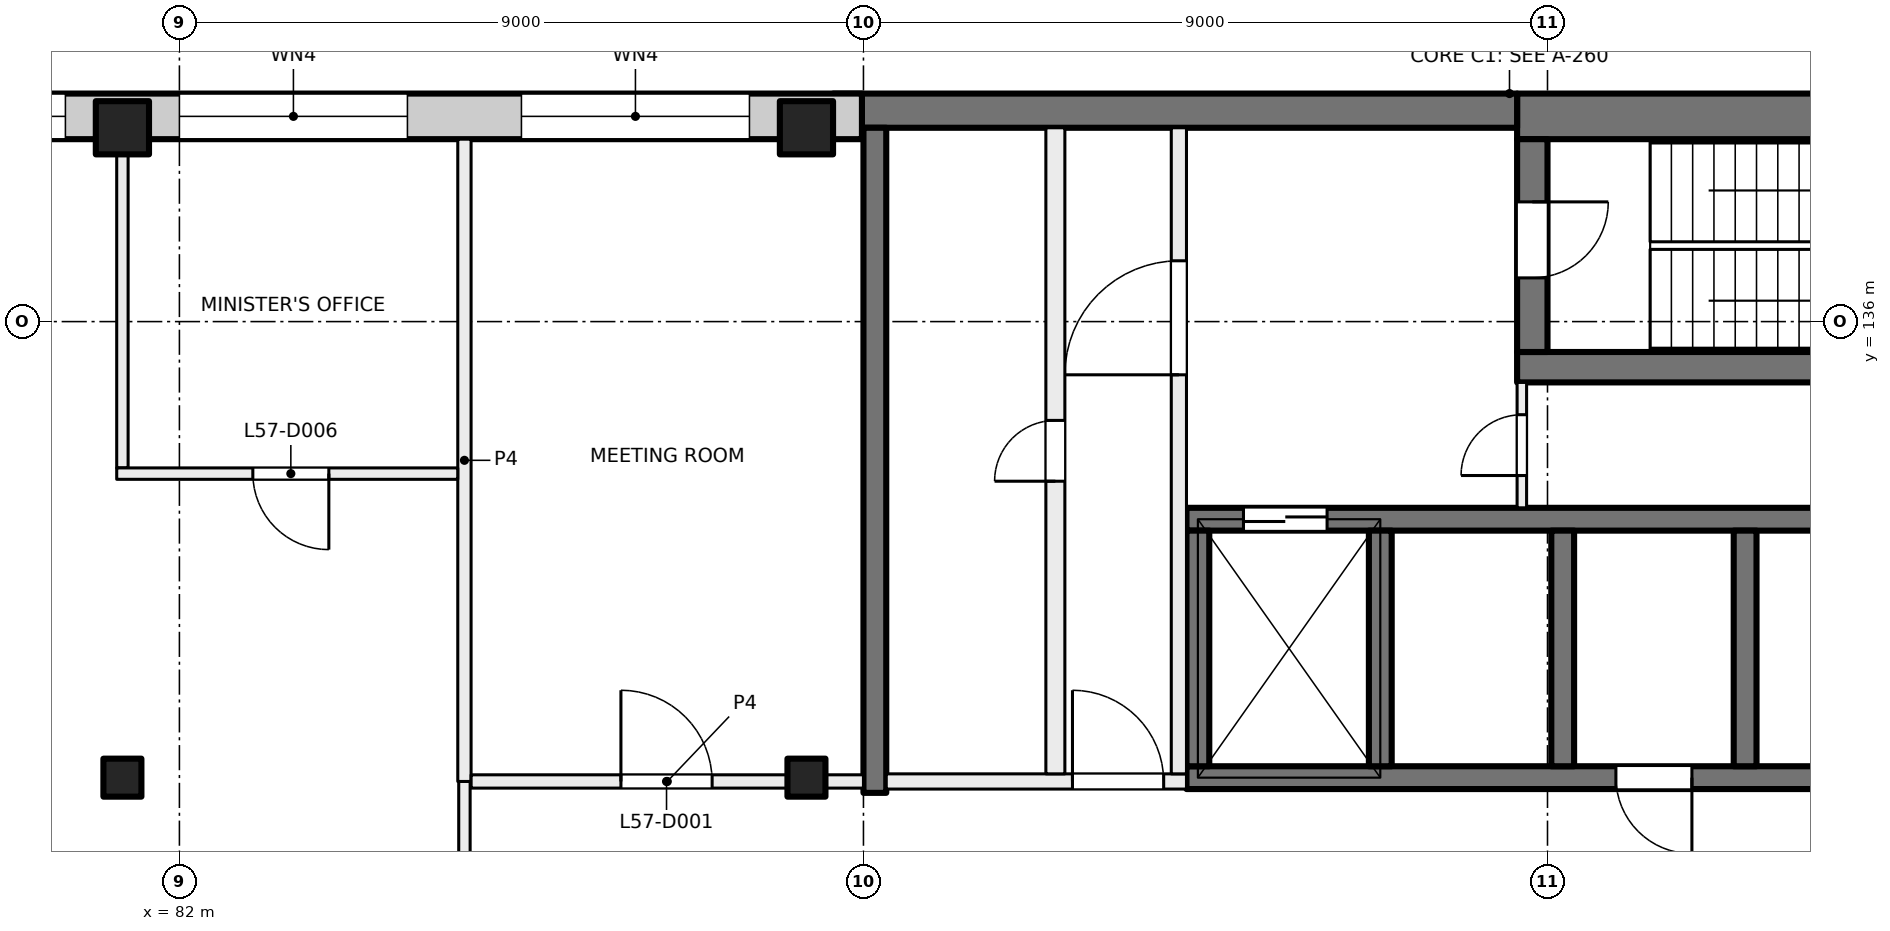
"""IFC4 building model, lengths in metres.
Left out: names, types, materials, properties, quantities, classifications, styles, units other than length and angle.
Written with IfcOpenShell. Run it as: python <this file> out.ifc"""

import sys

from ifc_helpers import new_model, si_unit, direction, frame, frame_2d, origin, origin_2d, place, context, subcontext, project, spatial, rectangle, extrude, element, fill, save


model = new_model("IFC4")
c1 = context("Model", 3, precision=1e-05, world=origin(), true_north=direction((0.0, 1.0)))
c2 = subcontext(c1, "Body", "Model", "MODEL_VIEW")
j1 = project(units=[si_unit("LENGTHUNIT", "METRE"), si_unit("PLANEANGLEUNIT", "RADIAN")], contexts=[c1])
p1 = place(None, origin())
s1 = spatial("IfcSite", under=j1, at=p1, CompositionType="ELEMENT")
p2 = place(p1, origin())
s2 = spatial("IfcBuilding", under=s1, at=p2, CompositionType="ELEMENT")
p3 = place(p2, frame((0.0, 0.0, 241.5)))
s3 = spatial("IfcBuildingStorey", under=s2, at=p3, CompositionType="ELEMENT", Elevation=241.5)
for number, where, z_axis, x_axis in (
    (1, (81.25, 130.0, 0.0), (0.0, 0.0, 1.0), (1.0, 0.0, 0.0)),
    (2, (90.25, 130.0, 0.0), (0.0, 0.0, 1.0), (1.0, 0.0, 0.0)),
):
    element("IfcColumn", number, at=place(p3, frame(where, z_axis=z_axis, x_axis=x_axis)), inside=s3, PredefinedType="COLUMN", context=c2, shape_type="SweptSolid", body=[
        extrude(rectangle(XDim=0.5, YDim=0.5, at=origin_2d()), origin(), (0.0, 0.0, 1.0), 4.0),
    ])
for number, where, z_axis, x_axis in (
    (3, (81.25, 138.55, 0.0), (0.0, 0.0, 1.0), (1.0, 0.0, 0.0)),
    (4, (90.25, 138.55, 0.0), (0.0, 0.0, 1.0), (1.0, 0.0, 0.0)),
):
    element("IfcColumn", number, at=place(p3, frame(where, z_axis=z_axis, x_axis=x_axis)), inside=s3, PredefinedType="COLUMN", context=c2, shape_type="SweptSolid", body=[
        extrude(rectangle(XDim=0.7, YDim=0.7, at=origin_2d()), origin(), (0.0, 0.0, 1.0), 4.0),
    ])
p4 = place(p3, frame((107.4, 138.7, 0.0), z_axis=(0.0, 0.0, 1.0), x_axis=(-1.0, 0.0, 0.0)))
e5 = element("IfcWall", 5, at=p4, inside=s3, PredefinedType="SHEAR", context=c2, shape_type="SweptSolid", body=[
    extrude(rectangle(XDim=7.8, YDim=0.6, at=frame_2d((3.9, 0.0))), origin(), (0.0, 0.0, 1.0), 4.0),
])
p5 = place(p3, frame((99.6, 138.775, 0.0), z_axis=(0.0, 0.0, 1.0), x_axis=(-1.0, 0.0, 0.0)))
e6 = element("IfcWall", 6, at=p5, inside=s3, PredefinedType="SHEAR", context=c2, shape_type="SweptSolid", body=[
    extrude(rectangle(XDim=9.0, YDim=0.45, at=frame_2d((4.5, 0.0))), origin(), (0.0, 0.0, 1.0), 4.0),
])
p6 = place(p3, frame((107.4, 135.4, 0.0), z_axis=(0.0, 0.0, 1.0), x_axis=(-1.0, 0.0, 0.0)))
e7 = element("IfcWall", 7, at=p6, inside=s3, PredefinedType="SHEAR", context=c2, shape_type="SweptSolid", body=[
    extrude(rectangle(XDim=7.8, YDim=0.4, at=frame_2d((3.9, 0.0))), origin(), (0.0, 0.0, 1.0), 4.0),
])
p7 = place(p3, frame((99.8, 138.4, 0.0), z_axis=(0.0, 0.0, 1.0), x_axis=(0.0, -1.0, 0.0)))
e8 = element("IfcWall", 8, at=p7, inside=s3, PredefinedType="SHEAR", context=c2, shape_type="SweptSolid", body=[
    extrude(rectangle(XDim=2.8, YDim=0.4, at=frame_2d((1.4, 0.0))), origin(), (0.0, 0.0, 1.0), 4.0),
])
p8 = place(p7, frame((0.825, 0.0, 0.0)))
e9 = element("IfcOpeningElement", 9, at=p8, cuts=e8, PredefinedType="OPENING", context=c2, shape_type="SweptSolid", body=[
    extrude(rectangle(XDim=1.0, YDim=2.1, at=frame_2d((0.5, 1.05))), frame((0.0, 0.21, 0.0), z_axis=(0.0, -1.0, 0.0), x_axis=(1.0, 0.0, 0.0)), (0.0, 0.0, 1.0), 0.42),
])
p9 = place(p3, frame((107.55, 130.0, 0.0), z_axis=(0.0, 0.0, 1.0), x_axis=(-1.0, 0.0, 0.0)))
e10 = element("IfcWall", 10, at=p9, inside=s3, PredefinedType="SHEAR", context=c2, shape_type="SweptSolid", body=[
    extrude(rectangle(XDim=12.3, YDim=0.3, at=frame_2d((6.15, 0.0))), origin(), (0.0, 0.0, 1.0), 4.0),
])
p10 = place(p9, frame((0.95, 0.0, 0.0)))
e11 = element("IfcOpeningElement", 11, at=p10, cuts=e10, PredefinedType="OPENING", context=c2, shape_type="SweptSolid", body=[
    extrude(rectangle(XDim=0.8, YDim=2.1, at=frame_2d((0.4, 1.05))), frame((0.0, 0.16, 0.0), z_axis=(0.0, -1.0, 0.0), x_axis=(1.0, 0.0, 0.0)), (0.0, 0.0, 1.0), 0.32),
])
p11 = place(p9, frame((5.65, 0.0, 0.0)))
e12 = element("IfcOpeningElement", 12, at=p11, cuts=e10, PredefinedType="OPENING", context=c2, shape_type="SweptSolid", body=[
    extrude(rectangle(XDim=1.0, YDim=2.1, at=frame_2d((0.5, 1.05))), frame((0.0, 0.16, 0.0), z_axis=(0.0, -1.0, 0.0), x_axis=(1.0, 0.0, 0.0)), (0.0, 0.0, 1.0), 0.32),
])
p12 = place(p3, frame((107.55, 133.4, 0.0), z_axis=(0.0, 0.0, 1.0), x_axis=(-1.0, 0.0, 0.0)))
e13 = element("IfcWall", 13, at=p12, inside=s3, PredefinedType="SHEAR", context=c2, shape_type="SweptSolid", body=[
    extrude(rectangle(XDim=12.3, YDim=0.3, at=frame_2d((6.15, 0.0))), origin(), (0.0, 0.0, 1.0), 4.0),
])
p13 = place(p12, frame((10.45, 0.0, 0.0)))
e14 = element("IfcOpeningElement", 14, at=p13, cuts=e13, PredefinedType="OPENING", context=c2, shape_type="SweptSolid", body=[
    extrude(rectangle(XDim=1.1, YDim=2.1, at=frame_2d((0.55, 1.05))), frame((0.0, 0.16, 0.0), z_axis=(0.0, -1.0, 0.0), x_axis=(1.0, 0.0, 0.0)), (0.0, 0.0, 1.0), 0.32),
])
for number, where, z_axis, x_axis in (
    (15, (102.6, 133.25, 0.0), (0.0, 0.0, 1.0), (0.0, -1.0, 0.0)),
    (16, (100.2, 133.25, 0.0), (0.0, 0.0, 1.0), (0.0, -1.0, 0.0)),
    (17, (97.8, 133.25, 0.0), (0.0, 0.0, 1.0), (0.0, -1.0, 0.0)),
    (18, (95.4, 133.25, 0.0), (0.0, 0.0, 1.0), (0.0, -1.0, 0.0)),
):
    element("IfcWall", number, at=place(p3, frame(where, z_axis=z_axis, x_axis=x_axis)), inside=s3, PredefinedType="SHEAR", context=c2, shape_type="SweptSolid", body=[
        extrude(rectangle(XDim=3.1, YDim=0.3, at=frame_2d((1.55, 0.0))), origin(), (0.0, 0.0, 1.0), 4.0),
    ])
p14 = place(p3, frame((91.15, 138.55, 0.0), z_axis=(0.0, 0.0, 1.0), x_axis=(0.0, -1.0, 0.0)))
e19 = element("IfcWall", 19, at=p14, inside=s3, PredefinedType="SHEAR", context=c2, shape_type="SweptSolid", body=[
    extrude(rectangle(XDim=8.75, YDim=0.3, at=frame_2d((4.375, 0.0))), origin(), (0.0, 0.0, 1.0), 4.0),
])
p15 = place(p3, frame((47.07, 138.7, 0.0), z_axis=(0.0, 0.0, 1.0), x_axis=(1.0, 0.0, 0.0)))
e20 = element("IfcWall", 20, at=p15, inside=s3, PredefinedType="SOLIDWALL", context=c2, shape_type="SweptSolid", body=[
    extrude(rectangle(XDim=43.91, YDim=0.6, at=frame_2d((21.955, 0.0))), origin(), (0.0, 0.0, 1.0), 3.625),
])
p16 = place(p15, frame((3.43, 0.0, 0.9)))
e21 = element("IfcOpeningElement", 21, at=p16, cuts=e20, PredefinedType="OPENING", context=c2, shape_type="SweptSolid", body=[
    extrude(rectangle(XDim=3.0, YDim=2.4, at=frame_2d((1.5, 1.2))), frame((0.0, 0.31, 0.0), z_axis=(0.0, -1.0, 0.0), x_axis=(1.0, 0.0, 0.0)), (0.0, 0.0, 1.0), 0.62),
])
p17 = place(p15, frame((7.93, 0.0, 0.9)))
e22 = element("IfcOpeningElement", 22, at=p17, cuts=e20, PredefinedType="OPENING", context=c2, shape_type="SweptSolid", body=[
    extrude(rectangle(XDim=3.0, YDim=2.4, at=frame_2d((1.5, 1.2))), frame((0.0, 0.31, 0.0), z_axis=(0.0, -1.0, 0.0), x_axis=(1.0, 0.0, 0.0)), (0.0, 0.0, 1.0), 0.62),
])
p18 = place(p15, frame((13.03, 0.0, 0.0)))
e23 = element("IfcOpeningElement", 23, at=p18, cuts=e20, PredefinedType="OPENING", context=c2, shape_type="SweptSolid", body=[
    extrude(rectangle(XDim=1.8, YDim=2.4, at=frame_2d((0.9, 1.2))), frame((0.0, 0.31, 0.0), z_axis=(0.0, -1.0, 0.0), x_axis=(1.0, 0.0, 0.0)), (0.0, 0.0, 1.0), 0.62),
])
p19 = place(p15, frame((16.93, 0.0, 0.9)))
e24 = element("IfcOpeningElement", 24, at=p19, cuts=e20, PredefinedType="OPENING", context=c2, shape_type="SweptSolid", body=[
    extrude(rectangle(XDim=3.0, YDim=2.4, at=frame_2d((1.5, 1.2))), frame((0.0, 0.31, 0.0), z_axis=(0.0, -1.0, 0.0), x_axis=(1.0, 0.0, 0.0)), (0.0, 0.0, 1.0), 0.62),
])
p20 = place(p15, frame((21.43, 0.0, 0.9)))
e25 = element("IfcOpeningElement", 25, at=p20, cuts=e20, PredefinedType="OPENING", context=c2, shape_type="SweptSolid", body=[
    extrude(rectangle(XDim=3.0, YDim=2.4, at=frame_2d((1.5, 1.2))), frame((0.0, 0.31, 0.0), z_axis=(0.0, -1.0, 0.0), x_axis=(1.0, 0.0, 0.0)), (0.0, 0.0, 1.0), 0.62),
])
p21 = place(p15, frame((25.93, 0.0, 0.9)))
e26 = element("IfcOpeningElement", 26, at=p21, cuts=e20, PredefinedType="OPENING", context=c2, shape_type="SweptSolid", body=[
    extrude(rectangle(XDim=3.0, YDim=2.4, at=frame_2d((1.5, 1.2))), frame((0.0, 0.31, 0.0), z_axis=(0.0, -1.0, 0.0), x_axis=(1.0, 0.0, 0.0)), (0.0, 0.0, 1.0), 0.62),
])
p22 = place(p15, frame((30.43, 0.0, 0.9)))
e27 = element("IfcOpeningElement", 27, at=p22, cuts=e20, PredefinedType="OPENING", context=c2, shape_type="SweptSolid", body=[
    extrude(rectangle(XDim=3.0, YDim=2.4, at=frame_2d((1.5, 1.2))), frame((0.0, 0.31, 0.0), z_axis=(0.0, -1.0, 0.0), x_axis=(1.0, 0.0, 0.0)), (0.0, 0.0, 1.0), 0.62),
])
p23 = place(p15, frame((34.93, 0.0, 0.9)))
e28 = element("IfcOpeningElement", 28, at=p23, cuts=e20, PredefinedType="OPENING", context=c2, shape_type="SweptSolid", body=[
    extrude(rectangle(XDim=3.0, YDim=2.4, at=frame_2d((1.5, 1.2))), frame((0.0, 0.31, 0.0), z_axis=(0.0, -1.0, 0.0), x_axis=(1.0, 0.0, 0.0)), (0.0, 0.0, 1.0), 0.62),
])
p24 = place(p15, frame((39.43, 0.0, 0.9)))
e29 = element("IfcOpeningElement", 29, at=p24, cuts=e20, PredefinedType="OPENING", context=c2, shape_type="SweptSolid", body=[
    extrude(rectangle(XDim=3.0, YDim=2.4, at=frame_2d((1.5, 1.2))), frame((0.0, 0.31, 0.0), z_axis=(0.0, -1.0, 0.0), x_axis=(1.0, 0.0, 0.0)), (0.0, 0.0, 1.0), 0.62),
])
p25 = place(p3, frame((91.3, 129.95, 0.0), z_axis=(0.0, 0.0, 1.0), x_axis=(1.0, 0.0, 0.0)))
e30 = element("IfcWall", 30, at=p25, inside=s3, PredefinedType="PARTITIONING", context=c2, shape_type="SweptSolid", body=[
    extrude(rectangle(XDim=3.95, YDim=0.2, at=frame_2d((1.975, 0.0))), origin(), (0.0, 0.0, 1.0), 3.625),
])
p26 = place(p25, frame((2.45, 0.0, 0.0)))
e31 = element("IfcOpeningElement", 31, at=p26, cuts=e30, PredefinedType="OPENING", context=c2, shape_type="SweptSolid", body=[
    extrude(rectangle(XDim=1.2, YDim=2.1, at=frame_2d((0.6, 1.05))), frame((0.0, 0.11, 0.0), z_axis=(0.0, -1.0, 0.0), x_axis=(1.0, 0.0, 0.0)), (0.0, 0.0, 1.0), 0.22),
])
p27 = place(p3, frame((95.15, 130.05, 0.0), z_axis=(0.0, 0.0, 1.0), x_axis=(0.0, 1.0, 0.0)))
e32 = element("IfcWall", 32, at=p27, inside=s3, PredefinedType="PARTITIONING", context=c2, shape_type="SweptSolid", body=[
    extrude(rectangle(XDim=8.5, YDim=0.2, at=frame_2d((4.25, 0.0))), origin(), (0.0, 0.0, 1.0), 3.625),
])
p28 = place(p27, frame((5.25, 0.0, 0.0)))
e33 = element("IfcOpeningElement", 33, at=p28, cuts=e32, PredefinedType="OPENING", context=c2, shape_type="SweptSolid", body=[
    extrude(rectangle(XDim=1.5, YDim=2.1, at=frame_2d((0.75, 1.05))), frame((0.0, 0.11, 0.0), z_axis=(0.0, -1.0, 0.0), x_axis=(1.0, 0.0, 0.0)), (0.0, 0.0, 1.0), 0.22),
])
p29 = place(p3, frame((93.525, 130.05, 0.0), z_axis=(0.0, 0.0, 1.0), x_axis=(0.0, 1.0, 0.0)))
e34 = element("IfcWall", 34, at=p29, inside=s3, PredefinedType="PARTITIONING", context=c2, shape_type="SweptSolid", body=[
    extrude(rectangle(XDim=8.5, YDim=0.25, at=frame_2d((4.25, 0.0))), origin(), (0.0, 0.0, 1.0), 3.625),
])
p30 = place(p29, frame((3.85, 0.0, 0.0)))
e35 = element("IfcOpeningElement", 35, at=p30, cuts=e34, PredefinedType="OPENING", context=c2, shape_type="SweptSolid", body=[
    extrude(rectangle(XDim=0.8, YDim=2.1, at=frame_2d((0.4, 1.05))), frame((0.0, 0.135, 0.0), z_axis=(0.0, -1.0, 0.0), x_axis=(1.0, 0.0, 0.0)), (0.0, 0.0, 1.0), 0.27),
])
p31 = place(p3, frame((99.663, 133.55, 0.0), z_axis=(0.0, 0.0, 1.0), x_axis=(0.0, 1.0, 0.0)))
e36 = element("IfcWall", 36, at=p31, inside=s3, PredefinedType="PARTITIONING", context=c2, shape_type="SweptSolid", body=[
    extrude(rectangle(XDim=1.65, YDim=0.125, at=frame_2d((0.825, 0.0))), origin(), (0.0, 0.0, 1.0), 3.625),
])
p32 = place(p31, frame((0.425, 0.0, 0.0)))
e37 = element("IfcOpeningElement", 37, at=p32, cuts=e36, PredefinedType="OPENING", context=c2, shape_type="SweptSolid", body=[
    extrude(rectangle(XDim=0.8, YDim=2.1, at=frame_2d((0.4, 1.05))), frame((0.0, 0.073, 0.0), z_axis=(0.0, -1.0, 0.0), x_axis=(1.0, 0.0, 0.0)), (0.0, 0.0, 1.0), 0.145),
])
p33 = place(p3, frame((81.25, 134.075, 0.0), z_axis=(0.0, 0.0, 1.0), x_axis=(0.0, 1.0, 0.0)))
e38 = element("IfcWall", 38, at=p33, inside=s3, PredefinedType="PARTITIONING", context=c2, shape_type="SweptSolid", body=[
    extrude(rectangle(XDim=4.325, YDim=0.15, at=frame_2d((2.163, 0.0))), origin(), (0.0, 0.0, 1.0), 3.625),
])
p34 = place(p3, frame((85.75, 126.06, 0.0), z_axis=(0.0, 0.0, 1.0), x_axis=(0.0, 1.0, 0.0)))
e39 = element("IfcWall", 39, at=p34, inside=s3, PredefinedType="PARTITIONING", context=c2, shape_type="SweptSolid", body=[
    extrude(rectangle(XDim=3.89, YDim=0.15, at=frame_2d((1.945, 0.0))), origin(), (0.0, 0.0, 1.0), 3.625),
])
p35 = place(p3, frame((85.75, 129.95, 0.0), z_axis=(0.0, 0.0, 1.0), x_axis=(0.0, 1.0, 0.0)))
e40 = element("IfcWall", 40, at=p35, inside=s3, PredefinedType="PARTITIONING", context=c2, shape_type="SweptSolid", body=[
    extrude(rectangle(XDim=8.45, YDim=0.175, at=frame_2d((4.225, 0.0))), origin(), (0.0, 0.0, 1.0), 3.625),
])
p36 = place(p3, frame((85.662, 134.0, 0.0), z_axis=(0.0, 0.0, 1.0), x_axis=(-1.0, 0.0, 0.0)))
e41 = element("IfcWall", 41, at=p36, inside=s3, PredefinedType="PARTITIONING", context=c2, shape_type="SweptSolid", body=[
    extrude(rectangle(XDim=4.487, YDim=0.15, at=frame_2d((2.244, 0.0))), origin(), (0.0, 0.0, 1.0), 3.625),
])
p37 = place(p36, frame((1.696, 0.0, 0.0)))
e42 = element("IfcOpeningElement", 42, at=p37, cuts=e41, PredefinedType="OPENING", context=c2, shape_type="SweptSolid", body=[
    extrude(rectangle(XDim=1.0, YDim=2.1, at=frame_2d((0.5, 1.05))), frame((0.0, 0.085, 0.0), z_axis=(0.0, -1.0, 0.0), x_axis=(1.0, 0.0, 0.0)), (0.0, 0.0, 1.0), 0.17),
])
p38 = place(p3, frame((85.838, 129.95, 0.0), z_axis=(0.0, 0.0, 1.0), x_axis=(1.0, 0.0, 0.0)))
e43 = element("IfcWall", 43, at=p38, inside=s3, PredefinedType="PARTITIONING", context=c2, shape_type="SweptSolid", body=[
    extrude(rectangle(XDim=5.162, YDim=0.175, at=frame_2d((2.581, 0.0))), origin(), (0.0, 0.0, 1.0), 3.625),
])
p39 = place(p38, frame((1.971, 0.0, 0.0)))
e44 = element("IfcOpeningElement", 44, at=p39, cuts=e43, PredefinedType="OPENING", context=c2, shape_type="SweptSolid", body=[
    extrude(rectangle(XDim=1.2, YDim=2.1, at=frame_2d((0.6, 1.05))), frame((0.0, 0.097, 0.0), z_axis=(0.0, -1.0, 0.0), x_axis=(1.0, 0.0, 0.0)), (0.0, 0.0, 1.0), 0.195),
])
p40 = place(p22, origin())
e45 = element("IfcWindow", 45, at=p40, inside=s3, PartitioningType="SINGLE_PANEL", PredefinedType="WINDOW", context=c2, shape_type="SweptSolid", body=[
    extrude(rectangle(XDim=3.0, YDim=2.4, at=frame_2d((1.5, 1.2))), frame((0.0, 0.03, 0.0), z_axis=(0.0, -1.0, 0.0), x_axis=(1.0, 0.0, 0.0)), (0.0, 0.0, 1.0), 0.06),
])
fill(e27, e45)
p41 = place(p23, origin())
e46 = element("IfcWindow", 46, at=p41, inside=s3, PartitioningType="SINGLE_PANEL", PredefinedType="WINDOW", context=c2, shape_type="SweptSolid", body=[
    extrude(rectangle(XDim=3.0, YDim=2.4, at=frame_2d((1.5, 1.2))), frame((0.0, 0.03, 0.0), z_axis=(0.0, -1.0, 0.0), x_axis=(1.0, 0.0, 0.0)), (0.0, 0.0, 1.0), 0.06),
])
fill(e28, e46)
p42 = place(p24, origin())
e47 = element("IfcWindow", 47, at=p42, inside=s3, PartitioningType="SINGLE_PANEL", PredefinedType="WINDOW", context=c2, shape_type="SweptSolid", body=[
    extrude(rectangle(XDim=3.0, YDim=2.4, at=frame_2d((1.5, 1.2))), frame((0.0, 0.03, 0.0), z_axis=(0.0, -1.0, 0.0), x_axis=(1.0, 0.0, 0.0)), (0.0, 0.0, 1.0), 0.06),
])
fill(e29, e47)
p43 = place(p11, origin())
e48 = element("IfcDoor", 48, at=p43, inside=s3, OperationType="SINGLE_SWING_RIGHT", PredefinedType="DOOR", context=c2, shape_type="SweptSolid", body=[
    extrude(rectangle(XDim=1.0, YDim=2.1, at=frame_2d((0.5, 1.05))), frame((0.0, 0.025, 0.0), z_axis=(0.0, -1.0, 0.0), x_axis=(1.0, 0.0, 0.0)), (0.0, 0.0, 1.0), 0.05),
])
fill(e12, e48)
p44 = place(p26, origin())
e49 = element("IfcDoor", 49, at=p44, inside=s3, OperationType="DOUBLE_DOOR_SINGLE_SWING", PredefinedType="DOOR", context=c2, shape_type="SweptSolid", body=[
    extrude(rectangle(XDim=1.2, YDim=2.1, at=frame_2d((0.6, 1.05))), frame((0.0, 0.025, 0.0), z_axis=(0.0, -1.0, 0.0), x_axis=(1.0, 0.0, 0.0)), (0.0, 0.0, 1.0), 0.05),
])
fill(e31, e49)
p45 = place(p28, origin())
e50 = element("IfcDoor", 50, at=p45, inside=s3, OperationType="DOUBLE_DOOR_SINGLE_SWING", PredefinedType="DOOR", context=c2, shape_type="SweptSolid", body=[
    extrude(rectangle(XDim=1.5, YDim=2.1, at=frame_2d((0.75, 1.05))), frame((0.0, 0.025, 0.0), z_axis=(0.0, -1.0, 0.0), x_axis=(1.0, 0.0, 0.0)), (0.0, 0.0, 1.0), 0.05),
])
fill(e33, e50)
p46 = place(p8, origin())
e51 = element("IfcDoor", 51, at=p46, inside=s3, OperationType="SINGLE_SWING_RIGHT", PredefinedType="DOOR", context=c2, shape_type="SweptSolid", body=[
    extrude(rectangle(XDim=1.0, YDim=2.1, at=frame_2d((0.5, 1.05))), frame((0.0, 0.025, 0.0), z_axis=(0.0, -1.0, 0.0), x_axis=(1.0, 0.0, 0.0)), (0.0, 0.0, 1.0), 0.05),
])
fill(e9, e51)
p47 = place(p32, origin())
e52 = element("IfcDoor", 52, at=p47, inside=s3, OperationType="SINGLE_SWING_LEFT", PredefinedType="DOOR", context=c2, shape_type="SweptSolid", body=[
    extrude(rectangle(XDim=0.8, YDim=2.1, at=frame_2d((0.4, 1.05))), frame((0.0, 0.025, 0.0), z_axis=(0.0, -1.0, 0.0), x_axis=(1.0, 0.0, 0.0)), (0.0, 0.0, 1.0), 0.05),
])
fill(e37, e52)
p48 = place(p30, origin())
e53 = element("IfcDoor", 53, at=p48, inside=s3, OperationType="SINGLE_SWING_RIGHT", PredefinedType="DOOR", context=c2, shape_type="SweptSolid", body=[
    extrude(rectangle(XDim=0.8, YDim=2.1, at=frame_2d((0.4, 1.05))), frame((0.0, 0.025, 0.0), z_axis=(0.0, -1.0, 0.0), x_axis=(1.0, 0.0, 0.0)), (0.0, 0.0, 1.0), 0.05),
])
fill(e35, e53)
p49 = place(p13, origin())
e54 = element("IfcDoor", 54, at=p49, inside=s3, OperationType="DOUBLE_DOOR_SLIDING", PredefinedType="DOOR", context=c2, shape_type="SweptSolid", body=[
    extrude(rectangle(XDim=1.1, YDim=2.1, at=frame_2d((0.55, 1.05))), frame((0.0, 0.025, 0.0), z_axis=(0.0, -1.0, 0.0), x_axis=(1.0, 0.0, 0.0)), (0.0, 0.0, 1.0), 0.05),
])
fill(e14, e54)
p50 = place(p39, origin())
e55 = element("IfcDoor", 55, at=p50, inside=s3, OperationType="DOUBLE_DOOR_SINGLE_SWING", PredefinedType="DOOR", context=c2, shape_type="SweptSolid", body=[
    extrude(rectangle(XDim=1.2, YDim=2.1, at=frame_2d((0.6, 1.05))), frame((0.0, 0.025, 0.0), z_axis=(0.0, -1.0, 0.0), x_axis=(1.0, 0.0, 0.0)), (0.0, 0.0, 1.0), 0.05),
])
fill(e44, e55)
p51 = place(p37, origin())
e56 = element("IfcDoor", 56, at=p51, inside=s3, OperationType="SINGLE_SWING_LEFT", PredefinedType="DOOR", context=c2, shape_type="SweptSolid", body=[
    extrude(rectangle(XDim=1.0, YDim=2.1, at=frame_2d((0.5, 1.05))), frame((0.0, 0.025, 0.0), z_axis=(0.0, -1.0, 0.0), x_axis=(1.0, 0.0, 0.0)), (0.0, 0.0, 1.0), 0.05),
])
fill(e42, e56)
save(model, sys.argv[1])
